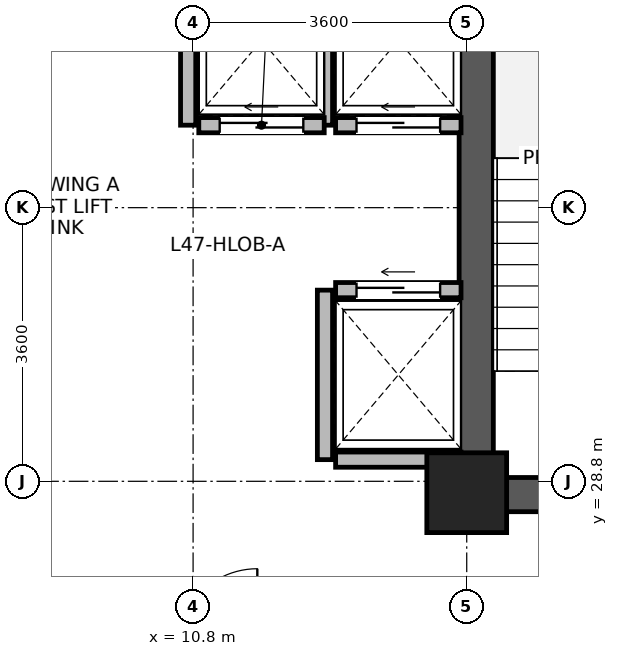
"""IFC4 building model, lengths in metres.
Left out: names, types, materials, properties, quantities, classifications, styles, units other than length and angle.
Written with IfcOpenShell. Run it as: python <this file> out.ifc"""

import sys

from ifc_helpers import new_model, si_unit, direction, frame, frame_2d, origin, origin_2d, place, context, subcontext, project, spatial, rectangle, extrude, source, transform, mapped, element, fill, save


model = new_model("IFC4")
c1 = context("Model", 3, precision=1e-05, world=origin(), true_north=direction((0.0, 1.0)))
c2 = subcontext(c1, "Body", "Model", "MODEL_VIEW")
j1 = project(units=[si_unit("LENGTHUNIT", "METRE"), si_unit("PLANEANGLEUNIT", "RADIAN")], contexts=[c1])
p1 = place(None, origin())
s1 = spatial("IfcSite", under=j1, at=p1, CompositionType="ELEMENT")
p2 = place(p1, origin())
s2 = spatial("IfcBuilding", under=s1, at=p2, CompositionType="ELEMENT")
p3 = place(p2, frame((0.0, 0.0, 184.6)))
s3 = spatial("IfcBuildingStorey", under=s2, at=p3, CompositionType="ELEMENT", Elevation=184.6)
p4 = place(p3, frame((14.525, 28.4, 0.0), z_axis=(0.0, 0.0, 1.0), x_axis=(0.0, 1.0, 0.0)))
e1 = element("IfcWall", 1, at=p4, inside=s3, PredefinedType="SHEAR", context=c2, shape_type="SweptSolid", body=[
    extrude(rectangle(XDim=7.9, YDim=0.45, at=frame_2d((3.95, 0.0))), origin(), (0.0, 0.0, 1.0), 3.46),
])
p5 = place(p3, frame((14.75, 28.625, 0.0), z_axis=(0.0, 0.0, 1.0), x_axis=(1.0, 0.0, 0.0)))
e2 = element("IfcWall", 2, at=p5, inside=s3, PredefinedType="SHEAR", context=c2, shape_type="SweptSolid", body=[
    extrude(rectangle(XDim=3.2, YDim=0.45, at=frame_2d((1.6, 0.0))), origin(), (0.0, 0.0, 1.0), 3.46),
])
m1 = source(origin(), c2, "Body", "SweptSolid", [
    extrude(rectangle(XDim=1.05, YDim=1.05, at=origin_2d()), origin(), (0.0, 0.0, 1.0), 3.7),
])
p6 = place(p3, frame((14.4, 28.65, 0.0), z_axis=(0.0, 0.0, 1.0), x_axis=(1.0, 0.0, 0.0)))
e3 = element("IfcColumn", 3, at=p6, inside=s3, PredefinedType="COLUMN", context=c2, shape_type="MappedRepresentation", body=[
    mapped(m1, transform((0.0, 0.0, 0.0), x_axis=(1.0, 0.0, 0.0), y_axis=(0.0, 1.0, 0.0), z_axis=(0.0, 0.0, 1.0), scale=1.0)),
])
p7 = place(p3, frame((12.675, 33.485, 0.0), z_axis=(0.0, 0.0, 1.0), x_axis=(1.0, 0.0, 0.0)))
e4 = element("IfcWall", 4, at=p7, inside=s3, PredefinedType="PARTITIONING", context=c2, shape_type="SweptSolid", body=[
    extrude(rectangle(XDim=1.65, YDim=0.2, at=frame_2d((0.825, 0.0))), origin(), (0.0, 0.0, 1.0), 3.44),
])
p8 = place(p7, frame((0.275, 0.0, 0.0)))
e5 = element("IfcOpeningElement", 5, at=p8, cuts=e4, PredefinedType="OPENING", context=c2, shape_type="SweptSolid", body=[
    extrude(rectangle(XDim=1.1, YDim=2.12, at=frame_2d((0.55, 1.06))), frame((0.0, 0.11, 0.0), z_axis=(0.0, -1.0, 0.0), x_axis=(1.0, 0.0, 0.0)), (0.0, 0.0, 1.0), 0.22),
])
p9 = place(p3, frame((12.535, 33.485, 0.0), z_axis=(0.0, 0.0, 1.0), x_axis=(0.0, 1.0, 0.0)))
e6 = element("IfcWall", 6, at=p9, inside=s3, PredefinedType="PARTITIONING", context=c2, shape_type="SweptSolid", body=[
    extrude(rectangle(XDim=2.23, YDim=0.2, at=frame_2d((1.115, 0.0))), origin(), (0.0, 0.0, 1.0), 3.44),
])
p10 = place(p3, frame((12.675, 29.085, 0.0), z_axis=(0.0, 0.0, 1.0), x_axis=(1.0, 0.0, 0.0)))
e7 = element("IfcWall", 7, at=p10, inside=s3, PredefinedType="PARTITIONING", context=c2, shape_type="SweptSolid", body=[
    extrude(rectangle(XDim=1.65, YDim=0.2, at=frame_2d((0.825, 0.0))), origin(), (0.0, 0.0, 1.0), 3.44),
])
p11 = place(p3, frame((12.675, 31.315, 0.0), z_axis=(0.0, 0.0, 1.0), x_axis=(1.0, 0.0, 0.0)))
e8 = element("IfcWall", 8, at=p11, inside=s3, PredefinedType="PARTITIONING", context=c2, shape_type="SweptSolid", body=[
    extrude(rectangle(XDim=1.65, YDim=0.2, at=frame_2d((0.825, 0.0))), origin(), (0.0, 0.0, 1.0), 3.44),
])
p12 = place(p11, frame((0.275, 0.0, 0.0)))
e9 = element("IfcOpeningElement", 9, at=p12, cuts=e8, PredefinedType="OPENING", context=c2, shape_type="SweptSolid", body=[
    extrude(rectangle(XDim=1.1, YDim=2.12, at=frame_2d((0.55, 1.06))), frame((0.0, 0.11, 0.0), z_axis=(0.0, -1.0, 0.0), x_axis=(1.0, 0.0, 0.0)), (0.0, 0.0, 1.0), 0.22),
])
p13 = place(p3, frame((12.535, 29.085, 0.0), z_axis=(0.0, 0.0, 1.0), x_axis=(0.0, 1.0, 0.0)))
e10 = element("IfcWall", 10, at=p13, inside=s3, PredefinedType="PARTITIONING", context=c2, shape_type="SweptSolid", body=[
    extrude(rectangle(XDim=2.23, YDim=0.2, at=frame_2d((1.115, 0.0))), origin(), (0.0, 0.0, 1.0), 3.44),
])
p14 = place(p3, frame((10.875, 33.485, 0.0), z_axis=(0.0, 0.0, 1.0), x_axis=(1.0, 0.0, 0.0)))
e11 = element("IfcWall", 11, at=p14, inside=s3, PredefinedType="PARTITIONING", context=c2, shape_type="SweptSolid", body=[
    extrude(rectangle(XDim=1.65, YDim=0.2, at=frame_2d((0.825, 0.0))), origin(), (0.0, 0.0, 1.0), 3.44),
])
p15 = place(p14, frame((0.275, 0.0, 0.0)))
e12 = element("IfcOpeningElement", 12, at=p15, cuts=e11, PredefinedType="OPENING", context=c2, shape_type="SweptSolid", body=[
    extrude(rectangle(XDim=1.1, YDim=2.12, at=frame_2d((0.55, 1.06))), frame((0.0, 0.11, 0.0), z_axis=(0.0, -1.0, 0.0), x_axis=(1.0, 0.0, 0.0)), (0.0, 0.0, 1.0), 0.22),
])
p16 = place(p3, frame((10.735, 33.485, 0.0), z_axis=(0.0, 0.0, 1.0), x_axis=(0.0, 1.0, 0.0)))
e13 = element("IfcWall", 13, at=p16, inside=s3, PredefinedType="PARTITIONING", context=c2, shape_type="SweptSolid", body=[
    extrude(rectangle(XDim=2.23, YDim=0.2, at=frame_2d((1.115, 0.0))), origin(), (0.0, 0.0, 1.0), 3.44),
])
p17 = place(p8, origin())
e14 = element("IfcDoor", 14, at=p17, inside=s3, OperationType="SLIDING_TO_LEFT", PredefinedType="DOOR", context=c2, shape_type="SweptSolid", body=[
    extrude(rectangle(XDim=1.1, YDim=2.12, at=frame_2d((0.55, 1.06))), frame((0.0, 0.025, 0.0), z_axis=(0.0, -1.0, 0.0), x_axis=(1.0, 0.0, 0.0)), (0.0, 0.0, 1.0), 0.05),
])
fill(e5, e14)
p18 = place(p12, origin())
e15 = element("IfcDoor", 15, at=p18, inside=s3, OperationType="SLIDING_TO_LEFT", PredefinedType="DOOR", context=c2, shape_type="SweptSolid", body=[
    extrude(rectangle(XDim=1.1, YDim=2.12, at=frame_2d((0.55, 1.06))), frame((0.0, 0.025, 0.0), z_axis=(0.0, -1.0, 0.0), x_axis=(1.0, 0.0, 0.0)), (0.0, 0.0, 1.0), 0.05),
])
fill(e9, e15)
p19 = place(p15, origin())
e16 = element("IfcDoor", 16, at=p19, inside=s3, OperationType="SLIDING_TO_LEFT", PredefinedType="DOOR", context=c2, shape_type="SweptSolid", body=[
    extrude(rectangle(XDim=1.1, YDim=2.12, at=frame_2d((0.55, 1.06))), frame((0.0, 0.025, 0.0), z_axis=(0.0, -1.0, 0.0), x_axis=(1.0, 0.0, 0.0)), (0.0, 0.0, 1.0), 0.05),
])
fill(e12, e16)
save(model, sys.argv[1])
